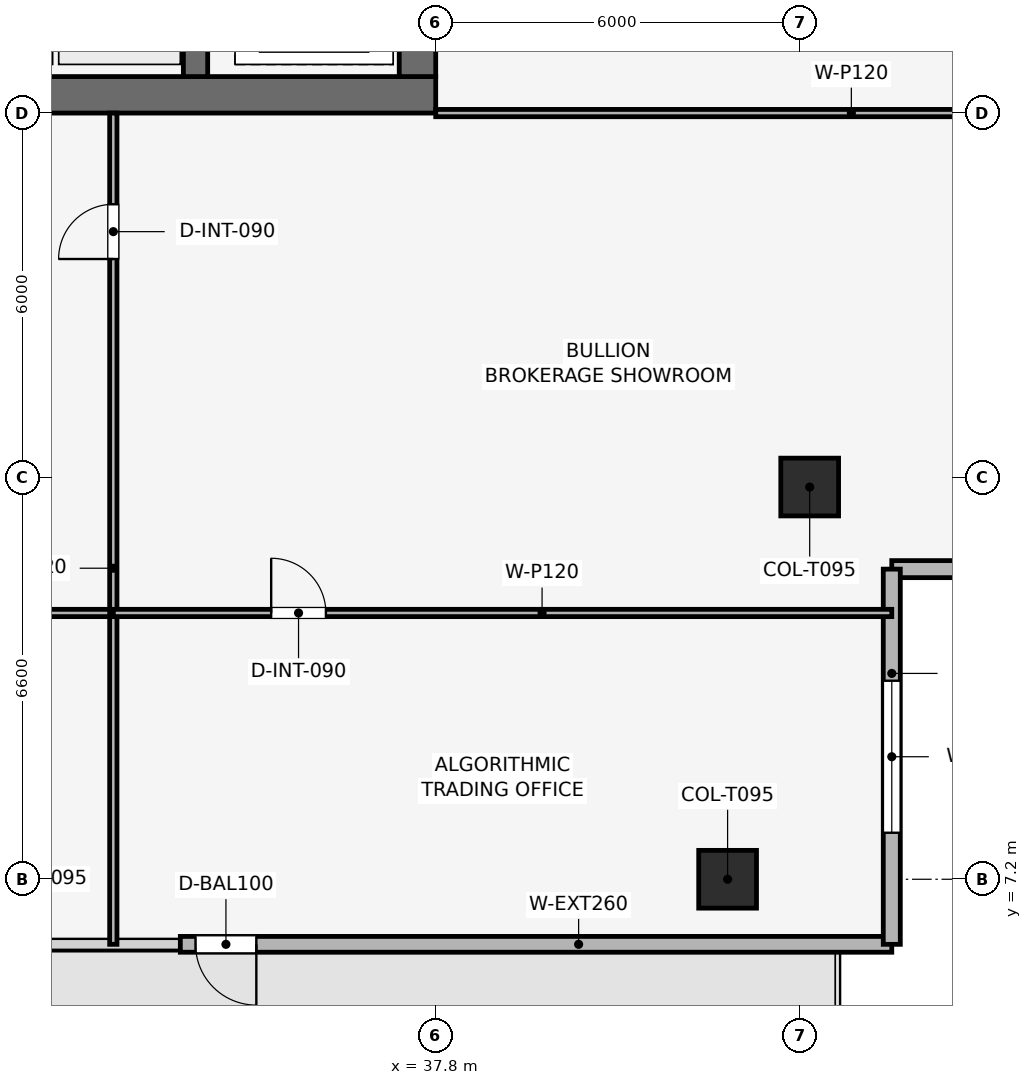
"""IFC4 building model, lengths in metres.
Left out: names, types, materials, properties, quantities, classifications, styles, units other than length and angle.
Written with IfcOpenShell. Run it as: python <this file> out.ifc"""

import sys

from ifc_helpers import new_model, si_unit, direction, frame, frame_2d, origin, origin_2d, place, context, subcontext, project, spatial, rectangle, extrude, element, fill, save


model = new_model("IFC4")
c1 = context("Model", 3, precision=1e-05, world=origin(), true_north=direction((0.0, 1.0)))
c2 = subcontext(c1, "Body", "Model", "MODEL_VIEW")
j1 = project(units=[si_unit("LENGTHUNIT", "METRE"), si_unit("PLANEANGLEUNIT", "RADIAN")], contexts=[c1])
p1 = place(None, origin())
s1 = spatial("IfcSite", under=j1, at=p1, CompositionType="ELEMENT")
p2 = place(p1, origin())
s2 = spatial("IfcBuilding", under=s1, at=p2, CompositionType="ELEMENT")
p3 = place(p2, frame((0.0, 0.0, 310.5)))
s3 = spatial("IfcBuildingStorey", under=s2, at=p3, CompositionType="ELEMENT", Elevation=310.5)
p4 = place(p3, frame((19.8, 20.1, 0.0), z_axis=(0.0, 0.0, 1.0), x_axis=(1.0, 0.0, 0.0)))
e1 = element("IfcWall", 1, at=p4, inside=s3, PredefinedType="SHEAR", context=c2, shape_type="SweptSolid", body=[
    extrude(rectangle(XDim=18.0, YDim=0.6, at=frame_2d((9.0, 0.0))), origin(), (0.0, 0.0, 1.0), 3.75),
])
p5 = place(p3, frame((37.5, 20.4, 0.0), z_axis=(0.0, 0.0, 1.0), x_axis=(0.0, 1.0, 0.0)))
e2 = element("IfcWall", 2, at=p5, inside=s3, PredefinedType="SHEAR", context=c2, shape_type="SweptSolid", body=[
    extrude(rectangle(XDim=16.8, YDim=0.6, at=frame_2d((8.4, 0.0))), origin(), (0.0, 0.0, 1.0), 3.75),
])
p6 = place(p5, frame((4.9, 0.0, 0.0)))
e3 = element("IfcOpeningElement", 3, at=p6, cuts=e2, PredefinedType="OPENING", context=c2, shape_type="SweptSolid", body=[
    extrude(rectangle(XDim=1.1, YDim=2.15, at=frame_2d((0.55, 1.075))), frame((0.0, 0.31, 0.0), z_axis=(0.0, -1.0, 0.0), x_axis=(1.0, 0.0, 0.0)), (0.0, 0.0, 1.0), 0.62),
])
p7 = place(p3, frame((33.85, 20.4, 0.0), z_axis=(0.0, 0.0, 1.0), x_axis=(0.0, 1.0, 0.0)))
e4 = element("IfcWall", 4, at=p7, inside=s3, PredefinedType="SHEAR", context=c2, shape_type="SweptSolid", body=[
    extrude(rectangle(XDim=16.8, YDim=0.4, at=frame_2d((8.4, 0.0))), origin(), (0.0, 0.0, 1.0), 3.75),
])
for number, where, z_axis, x_axis in (
    (5, (42.6, 7.2, 0.003), (0.0, 0.0, 1.0), (1.0, 0.0, 0.0)),
    (6, (43.95, 13.65, 0.003), (0.0, 0.0, 1.0), (1.0, 0.0, 0.0)),
):
    element("IfcColumn", number, at=place(p3, frame(where, z_axis=z_axis, x_axis=x_axis)), inside=s3, PredefinedType="COLUMN", context=c2, shape_type="SweptSolid", body=[
        extrude(rectangle(XDim=0.95, YDim=0.95, at=origin_2d()), origin(), (0.0, 0.0, 1.0), 3.504),
    ])
p8 = place(p3, frame((45.3, 6.13, 0.0), z_axis=(0.0, 0.0, 1.0), x_axis=(-1.0, 0.0, 0.0)))
e7 = element("IfcWall", 7, at=p8, inside=s3, PredefinedType="SOLIDWALL", context=c2, shape_type="SweptSolid", body=[
    extrude(rectangle(XDim=11.7, YDim=0.26, at=frame_2d((5.85, 0.0))), origin(), (0.0, 0.0, 1.0), 3.51),
])
p9 = place(p8, frame((10.45, 0.0, 0.0)))
e8 = element("IfcOpeningElement", 8, at=p9, cuts=e7, PredefinedType="OPENING", context=c2, shape_type="SweptSolid", body=[
    extrude(rectangle(XDim=1.0, YDim=2.2, at=frame_2d((0.5, 1.1))), frame((0.0, 0.14, 0.0), z_axis=(0.0, -1.0, 0.0), x_axis=(1.0, 0.0, 0.0)), (0.0, 0.0, 1.0), 0.28),
])
p10 = place(p3, frame((51.47, 12.3, 0.0), z_axis=(0.0, 0.0, 1.0), x_axis=(-1.0, 0.0, 0.0)))
e9 = element("IfcWall", 9, at=p10, inside=s3, PredefinedType="SOLIDWALL", context=c2, shape_type="SweptSolid", body=[
    extrude(rectangle(XDim=6.17, YDim=0.28, at=frame_2d((3.085, 0.0))), origin(), (0.0, 0.0, 1.0), 3.51),
])
p11 = place(p10, frame((1.835, 0.0, 0.9)))
e10 = element("IfcOpeningElement", 10, at=p11, cuts=e9, PredefinedType="OPENING", context=c2, shape_type="SweptSolid", body=[
    extrude(rectangle(XDim=2.5, YDim=1.9, at=frame_2d((1.25, 0.95))), frame((0.0, 0.15, 0.0), z_axis=(0.0, -1.0, 0.0), x_axis=(1.0, 0.0, 0.0)), (0.0, 0.0, 1.0), 0.3),
])
p12 = place(p3, frame((45.3, 12.3, 0.0), z_axis=(0.0, 0.0, 1.0), x_axis=(0.0, -1.0, 0.0)))
e11 = element("IfcWall", 11, at=p12, inside=s3, PredefinedType="SOLIDWALL", context=c2, shape_type="SweptSolid", body=[
    extrude(rectangle(XDim=6.17, YDim=0.28, at=frame_2d((3.085, 0.0))), origin(), (0.0, 0.0, 1.0), 3.51),
])
p13 = place(p12, frame((1.835, 0.0, 0.9)))
e12 = element("IfcOpeningElement", 12, at=p13, cuts=e11, PredefinedType="OPENING", context=c2, shape_type="SweptSolid", body=[
    extrude(rectangle(XDim=2.5, YDim=1.9, at=frame_2d((1.25, 0.95))), frame((0.0, 0.15, 0.0), z_axis=(0.0, -1.0, 0.0), x_axis=(1.0, 0.0, 0.0)), (0.0, 0.0, 1.0), 0.3),
])
p14 = place(p3, frame((22.217, 11.579, 0.0), z_axis=(0.0, 0.0, 1.0), x_axis=(1.0, 0.0, 0.0)))
e13 = element("IfcWall", 13, at=p14, inside=s3, PredefinedType="PARTITIONING", context=c2, shape_type="SweptSolid", body=[
    extrude(rectangle(XDim=10.281, YDim=0.12, at=frame_2d((5.141, 0.0))), origin(), (0.0, 0.0, 1.0), 3.095),
])
p15 = place(p14, frame((0.2, 0.0, 0.0)))
e14 = element("IfcOpeningElement", 14, at=p15, cuts=e13, PredefinedType="OPENING", context=c2, shape_type="SweptSolid", body=[
    extrude(rectangle(XDim=0.9, YDim=2.1, at=frame_2d((0.45, 1.05))), frame((0.0, 0.07, 0.0), z_axis=(0.0, -1.0, 0.0), x_axis=(1.0, 0.0, 0.0)), (0.0, 0.0, 1.0), 0.14),
])
p16 = place(p3, frame((32.498, 6.13, 0.0), z_axis=(0.0, 0.0, 1.0), x_axis=(0.0, 1.0, 0.0)))
e15 = element("IfcWall", 15, at=p16, inside=s3, PredefinedType="PARTITIONING", context=c2, shape_type="SweptSolid", body=[
    extrude(rectangle(XDim=13.67, YDim=0.12, at=frame_2d((6.835, 0.0))), origin(), (0.0, 0.0, 1.0), 3.135),
])
p17 = place(p16, frame((11.27, 0.0, 0.0)))
e16 = element("IfcOpeningElement", 16, at=p17, cuts=e15, PredefinedType="OPENING", context=c2, shape_type="SweptSolid", body=[
    extrude(rectangle(XDim=0.9, YDim=2.1, at=frame_2d((0.45, 1.05))), frame((0.0, 0.07, 0.0), z_axis=(0.0, -1.0, 0.0), x_axis=(1.0, 0.0, 0.0)), (0.0, 0.0, 1.0), 0.14),
])
p18 = place(p3, frame((32.498, 11.579, 0.0), z_axis=(0.0, 0.0, 1.0), x_axis=(1.0, 0.0, 0.0)))
e17 = element("IfcWall", 17, at=p18, inside=s3, PredefinedType="PARTITIONING", context=c2, shape_type="SweptSolid", body=[
    extrude(rectangle(XDim=12.802, YDim=0.12, at=frame_2d((6.401, 0.0))), origin(), (0.0, 0.0, 1.0), 3.095),
])
p19 = place(p18, frame((2.596, 0.0, 0.0)))
e18 = element("IfcOpeningElement", 18, at=p19, cuts=e17, PredefinedType="OPENING", context=c2, shape_type="SweptSolid", body=[
    extrude(rectangle(XDim=0.9, YDim=2.1, at=frame_2d((0.45, 1.05))), frame((0.0, 0.07, 0.0), z_axis=(0.0, -1.0, 0.0), x_axis=(1.0, 0.0, 0.0)), (0.0, 0.0, 1.0), 0.14),
])
p20 = place(p3, frame((37.8, 19.8, 0.0), z_axis=(0.0, 0.0, 1.0), x_axis=(1.0, 0.0, 0.0)))
e19 = element("IfcWall", 19, at=p20, inside=s3, PredefinedType="PARTITIONING", context=c2, shape_type="SweptSolid", body=[
    extrude(rectangle(XDim=13.67, YDim=0.12, at=frame_2d((6.835, 0.0))), origin(), (0.0, 0.0, 1.0), 3.095),
])
p21 = place(p9, origin())
e20 = element("IfcDoor", 20, at=p21, inside=s3, OperationType="SINGLE_SWING_LEFT", PredefinedType="DOOR", context=c2, shape_type="SweptSolid", body=[
    extrude(rectangle(XDim=1.0, YDim=2.2, at=frame_2d((0.5, 1.1))), frame((0.0, 0.025, 0.0), z_axis=(0.0, -1.0, 0.0), x_axis=(1.0, 0.0, 0.0)), (0.0, 0.0, 1.0), 0.05),
])
fill(e8, e20)
p22 = place(p13, origin())
e21 = element("IfcWindow", 21, at=p22, inside=s3, PartitioningType="SINGLE_PANEL", PredefinedType="WINDOW", context=c2, shape_type="SweptSolid", body=[
    extrude(rectangle(XDim=2.5, YDim=1.9, at=frame_2d((1.25, 0.95))), frame((0.0, 0.03, 0.0), z_axis=(0.0, -1.0, 0.0), x_axis=(1.0, 0.0, 0.0)), (0.0, 0.0, 1.0), 0.06),
])
fill(e12, e21)
p23 = place(p17, origin())
e22 = element("IfcDoor", 22, at=p23, inside=s3, OperationType="SINGLE_SWING_LEFT", PredefinedType="DOOR", context=c2, shape_type="SweptSolid", body=[
    extrude(rectangle(XDim=0.9, YDim=2.1, at=frame_2d((0.45, 1.05))), frame((0.0, 0.025, 0.0), z_axis=(0.0, -1.0, 0.0), x_axis=(1.0, 0.0, 0.0)), (0.0, 0.0, 1.0), 0.05),
])
fill(e16, e22)
p24 = place(p19, origin())
e23 = element("IfcDoor", 23, at=p24, inside=s3, OperationType="SINGLE_SWING_LEFT", PredefinedType="DOOR", context=c2, shape_type="SweptSolid", body=[
    extrude(rectangle(XDim=0.9, YDim=2.1, at=frame_2d((0.45, 1.05))), frame((0.0, 0.025, 0.0), z_axis=(0.0, -1.0, 0.0), x_axis=(1.0, 0.0, 0.0)), (0.0, 0.0, 1.0), 0.05),
])
fill(e18, e23)
save(model, sys.argv[1])
